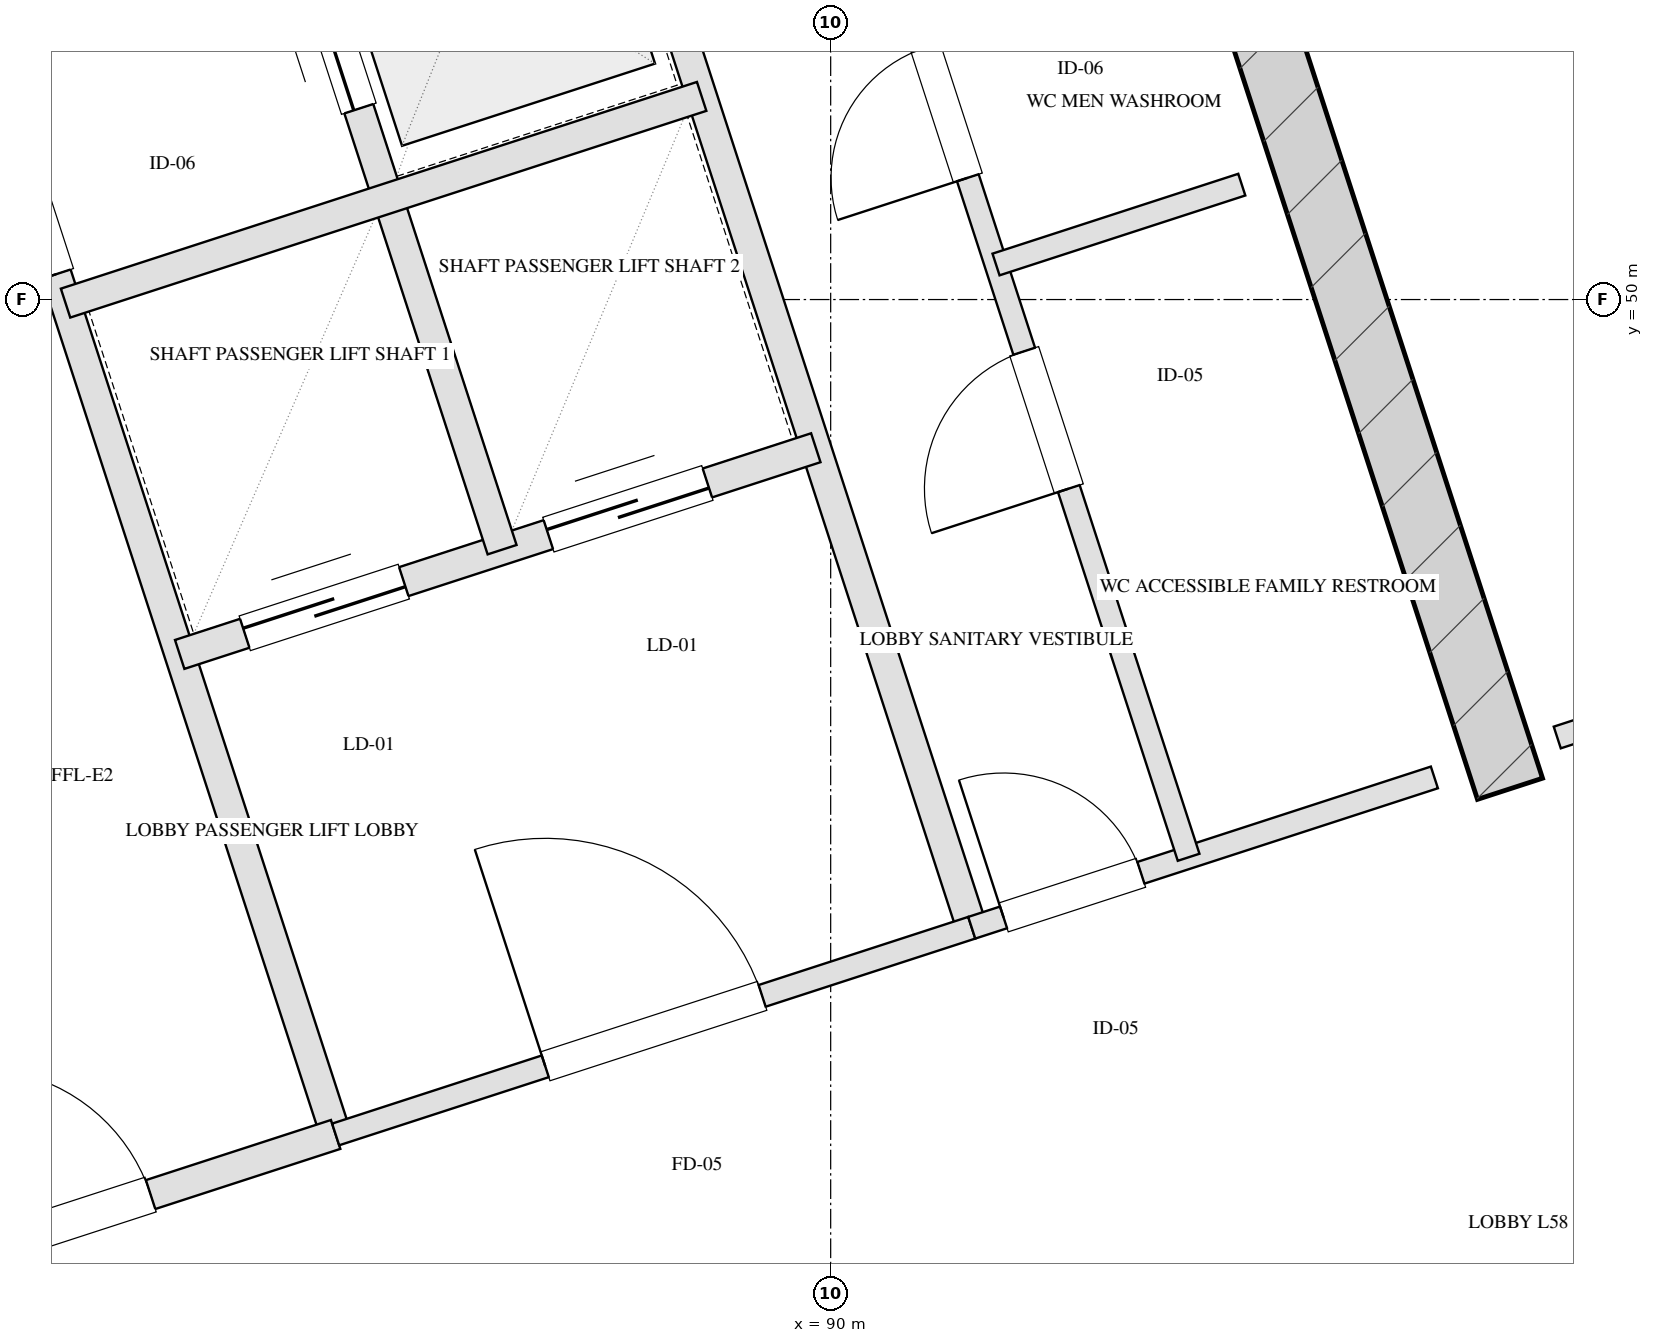
"""IFC4 building model, lengths in metres.
Left out: names, types, materials, properties, quantities, classifications, styles, units other than length and angle.
Written with IfcOpenShell. Run it as: python <this file> out.ifc"""

import sys

from ifc_helpers import new_model, si_unit, direction, frame, frame_2d, origin, place, context, subcontext, project, spatial, rectangle, extrude, element, fill, save


model = new_model("IFC4")
c1 = context("Model", 3, precision=1e-05, world=origin(), true_north=direction((0.0, 1.0)))
c2 = subcontext(c1, "Body", "Model", "MODEL_VIEW")
j1 = project(units=[si_unit("LENGTHUNIT", "METRE"), si_unit("PLANEANGLEUNIT", "RADIAN")], contexts=[c1])
p1 = place(None, origin())
s1 = spatial("IfcSite", under=j1, at=p1, CompositionType="ELEMENT")
p2 = place(p1, origin())
s2 = spatial("IfcBuilding", under=s1, at=p2, CompositionType="ELEMENT")
p3 = place(p2, frame((0.0, 0.0, 216.2)))
s3 = spatial("IfcBuildingStorey", under=s2, at=p3, CompositionType="ELEMENT", Elevation=216.2)
p4 = place(p3, frame((76.415, 50.489, 0.0), z_axis=(0.0, 0.0, 1.0), x_axis=(0.951056810414, 0.309016089169, 0.0)))
e1 = element("IfcWall", 1, at=p4, inside=s3, PredefinedType="SHEAR", context=c2, shape_type="SweptSolid", body=[
    extrude(rectangle(XDim=16.25, YDim=0.45, at=frame_2d((8.125, 0.0))), origin(), (0.0, 0.0, 1.0), 3.45),
])
p5 = place(p3, frame((94.469, 46.781, 0.0), z_axis=(0.0, 0.0, 1.0), x_axis=(-0.309004419953, 0.951060601881, 0.0)))
e2 = element("IfcWall", 2, at=p5, inside=s3, PredefinedType="SHEAR", context=c2, shape_type="SweptSolid", body=[
    extrude(rectangle(XDim=9.33, YDim=0.45, at=frame_2d((4.665, 0.0))), origin(), (0.0, 0.0, 1.0), 3.45),
])
p6 = place(p3, frame((72.165, 50.706, 0.0), z_axis=(0.0, 0.0, 1.0), x_axis=(0.951058012937, 0.309012388148, 0.0)))
e3 = element("IfcWall", 3, at=p6, inside=s3, PredefinedType="SOLIDWALL", context=c2, shape_type="SweptSolid", body=[
    extrude(rectangle(XDim=23.6, YDim=0.4, at=frame_2d((11.8, 0.0))), origin(), (0.0, 0.0, 1.0), 2.55),
])
p7 = place(p3, frame((86.743, 44.508, 0.0), z_axis=(0.0, 0.0, 1.0), x_axis=(-0.309016001439, 0.951056838919, 0.0)))
e4 = element("IfcWall", 4, at=p7, inside=s3, PredefinedType="PARTITIONING", context=c2, shape_type="SweptSolid", body=[
    extrude(rectangle(XDim=8.43, YDim=0.2, at=frame_2d((4.215, 0.0))), origin(), (0.0, 0.0, 1.0), 3.155),
])
p8 = place(p7, frame((5.95, 0.0, 0.0)))
e5 = element("IfcOpeningElement", 5, at=p8, cuts=e4, PredefinedType="OPENING", context=c2, shape_type="SweptSolid", body=[
    extrude(rectangle(XDim=0.9, YDim=2.05, at=frame_2d((0.45, 1.025))), frame((0.0, 0.11, 0.0), z_axis=(0.0, -1.0, 0.0), x_axis=(1.0, 0.0, 0.0)), (0.0, 0.0, 1.0), 0.22),
])
p9 = place(p3, frame((83.101, 43.324, 0.0), z_axis=(0.0, 0.0, 1.0), x_axis=(0.951052804469, 0.309028417967, 0.0)))
e6 = element("IfcWall", 6, at=p9, inside=s3, PredefinedType="PARTITIONING", context=c2, shape_type="SweptSolid", body=[
    extrude(rectangle(XDim=3.83, YDim=0.2, at=frame_2d((1.915, 0.0))), origin(), (0.0, 0.0, 1.0), 3.155),
])
p10 = place(p9, frame((1.35, 0.0, 0.0)))
e7 = element("IfcOpeningElement", 7, at=p10, cuts=e6, PredefinedType="OPENING", context=c2, shape_type="SweptSolid", body=[
    extrude(rectangle(XDim=1.2, YDim=2.05, at=frame_2d((0.6, 1.025))), frame((0.0, 0.11, 0.0), z_axis=(0.0, -1.0, 0.0), x_axis=(1.0, 0.0, 0.0)), (0.0, 0.0, 1.0), 0.22),
])
p11 = place(p3, frame((90.928, 45.868, 0.0), z_axis=(0.0, 0.0, 1.0), x_axis=(-0.309042196757, 0.951048327176, 0.0)))
e8 = element("IfcWall", 8, at=p11, inside=s3, PredefinedType="PARTITIONING", context=c2, shape_type="SweptSolid", body=[
    extrude(rectangle(XDim=8.43, YDim=0.2, at=frame_2d((4.215, 0.0))), origin(), (0.0, 0.0, 1.0), 3.155),
])
p12 = place(p3, frame((86.743, 44.508, 0.0), z_axis=(0.0, 0.0, 1.0), x_axis=(0.951063829732, 0.308994485023, 0.0)))
e9 = element("IfcWall", 9, at=p12, inside=s3, PredefinedType="PARTITIONING", context=c2, shape_type="SweptSolid", body=[
    extrude(rectangle(XDim=4.4, YDim=0.15, at=frame_2d((2.2, 0.0))), origin(), (0.0, 0.0, 1.0), 3.155),
])
p13 = place(p12, frame((1.45, 0.0, 0.0)))
e10 = element("IfcOpeningElement", 10, at=p13, cuts=e9, PredefinedType="OPENING", context=c2, shape_type="SweptSolid", body=[
    extrude(rectangle(XDim=1.5, YDim=2.05, at=frame_2d((0.75, 1.025))), frame((0.0, 0.085, 0.0), z_axis=(0.0, -1.0, 0.0), x_axis=(1.0, 0.0, 0.0)), (0.0, 0.0, 1.0), 0.17),
])
p14 = place(p3, frame((85.718, 47.666, 0.0), z_axis=(0.0, 0.0, 1.0), x_axis=(0.951058531764, 0.30901079133, 0.0)))
e11 = element("IfcWall", 11, at=p14, inside=s3, PredefinedType="PARTITIONING", context=c2, shape_type="SweptSolid", body=[
    extrude(rectangle(XDim=4.4, YDim=0.2, at=frame_2d((2.2, 0.0))), origin(), (0.0, 0.0, 1.0), 3.155),
])
p15 = place(p14, frame((0.45, 0.0, 0.0)))
e12 = element("IfcOpeningElement", 12, at=p15, cuts=e11, PredefinedType="OPENING", context=c2, shape_type="SweptSolid", body=[
    extrude(rectangle(XDim=1.1, YDim=2.05, at=frame_2d((0.55, 1.025))), frame((0.0, 0.11, 0.0), z_axis=(0.0, -1.0, 0.0), x_axis=(1.0, 0.0, 0.0)), (0.0, 0.0, 1.0), 0.22),
])
p16 = place(p14, frame((2.55, 0.0, 0.0)))
e13 = element("IfcOpeningElement", 13, at=p16, cuts=e11, PredefinedType="OPENING", context=c2, shape_type="SweptSolid", body=[
    extrude(rectangle(XDim=1.1, YDim=2.05, at=frame_2d((0.55, 1.025))), frame((0.0, 0.11, 0.0), z_axis=(0.0, -1.0, 0.0), x_axis=(1.0, 0.0, 0.0)), (0.0, 0.0, 1.0), 0.22),
])
p17 = place(p3, frame((87.838, 48.354, 0.0), z_axis=(0.0, 0.0, 1.0), x_axis=(-0.3090093719, 0.951058992953, 0.0)))
e14 = element("IfcWall", 14, at=p17, inside=s3, PredefinedType="PARTITIONING", context=c2, shape_type="SweptSolid", body=[
    extrude(rectangle(XDim=5.11, YDim=0.2, at=frame_2d((2.555, 0.0))), origin(), (0.0, 0.0, 1.0), 3.155),
])
p18 = place(p17, frame((3.05, 0.0, 0.0)))
e15 = element("IfcOpeningElement", 15, at=p18, cuts=e14, PredefinedType="OPENING", context=c2, shape_type="SweptSolid", body=[
    extrude(rectangle(XDim=1.1, YDim=2.05, at=frame_2d((0.55, 1.025))), frame((0.0, 0.11, 0.0), z_axis=(0.0, -1.0, 0.0), x_axis=(1.0, 0.0, 0.0)), (0.0, 0.0, 1.0), 0.22),
])
p19 = place(p3, frame((84.967, 49.977, 0.0), z_axis=(0.0, 0.0, 1.0), x_axis=(0.951063829732, 0.308994485023, 0.0)))
e16 = element("IfcWall", 16, at=p19, inside=s3, PredefinedType="PARTITIONING", context=c2, shape_type="SweptSolid", body=[
    extrude(rectangle(XDim=4.4, YDim=0.2, at=frame_2d((2.2, 0.0))), origin(), (0.0, 0.0, 1.0), 3.155),
])
p20 = place(p3, frame((90.928, 45.868, 0.0), z_axis=(0.0, 0.0, 1.0), x_axis=(0.951059297078, 0.309008435874, 0.0)))
e17 = element("IfcWall", 17, at=p20, inside=s3, PredefinedType="PARTITIONING", context=c2, shape_type="SweptSolid", body=[
    extrude(rectangle(XDim=3.2, YDim=0.15, at=frame_2d((1.6, 0.0))), origin(), (0.0, 0.0, 1.0), 3.155),
])
p21 = place(p20, frame((0.22, 0.0, 0.0)))
e18 = element("IfcOpeningElement", 18, at=p21, cuts=e17, PredefinedType="OPENING", context=c2, shape_type="SweptSolid", body=[
    extrude(rectangle(XDim=0.95, YDim=2.05, at=frame_2d((0.475, 1.025))), frame((0.0, 0.085, 0.0), z_axis=(0.0, -1.0, 0.0), x_axis=(1.0, 0.0, 0.0)), (0.0, 0.0, 1.0), 0.17),
])
p22 = place(p3, frame((92.355, 46.331, 0.0), z_axis=(0.0, 0.0, 1.0), x_axis=(-0.309007490203, 0.951059604335, 0.0)))
e19 = element("IfcWall", 19, at=p22, inside=s3, PredefinedType="PARTITIONING", context=c2, shape_type="SweptSolid", body=[
    extrude(rectangle(XDim=8.43, YDim=0.15, at=frame_2d((4.215, 0.0))), origin(), (0.0, 0.0, 1.0), 3.155),
])
p23 = place(p22, frame((2.55, 0.0, 0.0)))
e20 = element("IfcOpeningElement", 20, at=p23, cuts=e19, PredefinedType="OPENING", context=c2, shape_type="SweptSolid", body=[
    extrude(rectangle(XDim=0.95, YDim=2.05, at=frame_2d((0.475, 1.025))), frame((0.0, 0.085, 0.0), z_axis=(0.0, -1.0, 0.0), x_axis=(1.0, 0.0, 0.0)), (0.0, 0.0, 1.0), 0.17),
])
p24 = place(p22, frame((4.7, 0.0, 0.0)))
e21 = element("IfcOpeningElement", 21, at=p24, cuts=e19, PredefinedType="OPENING", context=c2, shape_type="SweptSolid", body=[
    extrude(rectangle(XDim=0.9, YDim=2.05, at=frame_2d((0.45, 1.025))), frame((0.0, 0.085, 0.0), z_axis=(0.0, -1.0, 0.0), x_axis=(1.0, 0.0, 0.0)), (0.0, 0.0, 1.0), 0.17),
])
p25 = place(p22, frame((6.8, 0.0, 0.0)))
e22 = element("IfcOpeningElement", 22, at=p25, cuts=e19, PredefinedType="OPENING", context=c2, shape_type="SweptSolid", body=[
    extrude(rectangle(XDim=0.9, YDim=2.05, at=frame_2d((0.45, 1.025))), frame((0.0, 0.085, 0.0), z_axis=(0.0, -1.0, 0.0), x_axis=(1.0, 0.0, 0.0)), (0.0, 0.0, 1.0), 0.17),
])
p26 = place(p3, frame((91.088, 50.23, 0.0), z_axis=(0.0, 0.0, 1.0), x_axis=(0.951054116971, 0.309024378638, 0.0)))
e23 = element("IfcWall", 23, at=p26, inside=s3, PredefinedType="PARTITIONING", context=c2, shape_type="SweptSolid", body=[
    extrude(rectangle(XDim=1.7, YDim=0.15, at=frame_2d((0.85, 0.0))), origin(), (0.0, 0.0, 1.0), 3.155),
])
p27 = place(p3, frame((94.78, 47.119, 0.0), z_axis=(0.0, 0.0, 1.0), x_axis=(0.951055112834, 0.309021313752, 0.0)))
e24 = element("IfcWall", 24, at=p27, inside=s3, PredefinedType="PARTITIONING", context=c2, shape_type="SweptSolid", body=[
    extrude(rectangle(XDim=5.2, YDim=0.15, at=frame_2d((2.6, 0.0))), origin(), (0.0, 0.0, 1.0), 3.155),
])
p28 = place(p27, frame((2.184, 0.0, 0.0)))
e25 = element("IfcOpeningElement", 25, at=p28, cuts=e24, PredefinedType="OPENING", context=c2, shape_type="SweptSolid", body=[
    extrude(rectangle(XDim=1.0, YDim=2.05, at=frame_2d((0.5, 1.025))), frame((0.0, 0.085, 0.0), z_axis=(0.0, -1.0, 0.0), x_axis=(1.0, 0.0, 0.0)), (0.0, 0.0, 1.0), 0.17),
])
p29 = place(p8, origin())
e26 = element("IfcDoor", 26, at=p29, inside=s3, OperationType="SINGLE_SWING_LEFT", PredefinedType="DOOR", context=c2, shape_type="SweptSolid", body=[
    extrude(rectangle(XDim=0.9, YDim=2.05, at=frame_2d((0.45, 1.025))), frame((0.0, 0.025, 0.0), z_axis=(0.0, -1.0, 0.0), x_axis=(1.0, 0.0, 0.0)), (0.0, 0.0, 1.0), 0.05),
])
fill(e5, e26)
p30 = place(p10, origin())
e27 = element("IfcDoor", 27, at=p30, inside=s3, OperationType="SINGLE_SWING_LEFT", PredefinedType="DOOR", context=c2, shape_type="SweptSolid", body=[
    extrude(rectangle(XDim=1.2, YDim=2.05, at=frame_2d((0.6, 1.025))), frame((0.0, 0.025, 0.0), z_axis=(0.0, -1.0, 0.0), x_axis=(1.0, 0.0, 0.0)), (0.0, 0.0, 1.0), 0.05),
])
fill(e7, e27)
p31 = place(p13, origin())
e28 = element("IfcDoor", 28, at=p31, inside=s3, OperationType="SINGLE_SWING_LEFT", PredefinedType="DOOR", context=c2, shape_type="SweptSolid", body=[
    extrude(rectangle(XDim=1.5, YDim=2.05, at=frame_2d((0.75, 1.025))), frame((0.0, 0.025, 0.0), z_axis=(0.0, -1.0, 0.0), x_axis=(1.0, 0.0, 0.0)), (0.0, 0.0, 1.0), 0.05),
])
fill(e10, e28)
p32 = place(p15, origin())
e29 = element("IfcDoor", 29, at=p32, inside=s3, OperationType="DOUBLE_DOOR_SLIDING", PredefinedType="DOOR", context=c2, shape_type="SweptSolid", body=[
    extrude(rectangle(XDim=1.1, YDim=2.05, at=frame_2d((0.55, 1.025))), frame((0.0, 0.025, 0.0), z_axis=(0.0, -1.0, 0.0), x_axis=(1.0, 0.0, 0.0)), (0.0, 0.0, 1.0), 0.05),
])
fill(e12, e29)
p33 = place(p16, origin())
e30 = element("IfcDoor", 30, at=p33, inside=s3, OperationType="DOUBLE_DOOR_SLIDING", PredefinedType="DOOR", context=c2, shape_type="SweptSolid", body=[
    extrude(rectangle(XDim=1.1, YDim=2.05, at=frame_2d((0.55, 1.025))), frame((0.0, 0.025, 0.0), z_axis=(0.0, -1.0, 0.0), x_axis=(1.0, 0.0, 0.0)), (0.0, 0.0, 1.0), 0.05),
])
fill(e13, e30)
p34 = place(p18, origin())
e31 = element("IfcDoor", 31, at=p34, inside=s3, OperationType="DOUBLE_DOOR_SLIDING", PredefinedType="DOOR", context=c2, shape_type="SweptSolid", body=[
    extrude(rectangle(XDim=1.1, YDim=2.05, at=frame_2d((0.55, 1.025))), frame((0.0, 0.025, 0.0), z_axis=(0.0, -1.0, 0.0), x_axis=(1.0, 0.0, 0.0)), (0.0, 0.0, 1.0), 0.05),
])
fill(e15, e31)
p35 = place(p21, origin())
e32 = element("IfcDoor", 32, at=p35, inside=s3, OperationType="SINGLE_SWING_LEFT", PredefinedType="DOOR", context=c2, shape_type="SweptSolid", body=[
    extrude(rectangle(XDim=0.95, YDim=2.05, at=frame_2d((0.475, 1.025))), frame((0.0, 0.025, 0.0), z_axis=(0.0, -1.0, 0.0), x_axis=(1.0, 0.0, 0.0)), (0.0, 0.0, 1.0), 0.05),
])
fill(e18, e32)
p36 = place(p23, origin())
e33 = element("IfcDoor", 33, at=p36, inside=s3, OperationType="SINGLE_SWING_LEFT", PredefinedType="DOOR", context=c2, shape_type="SweptSolid", body=[
    extrude(rectangle(XDim=0.95, YDim=2.05, at=frame_2d((0.475, 1.025))), frame((0.0, 0.025, 0.0), z_axis=(0.0, -1.0, 0.0), x_axis=(1.0, 0.0, 0.0)), (0.0, 0.0, 1.0), 0.05),
])
fill(e20, e33)
p37 = place(p24, origin())
e34 = element("IfcDoor", 34, at=p37, inside=s3, OperationType="SINGLE_SWING_LEFT", PredefinedType="DOOR", context=c2, shape_type="SweptSolid", body=[
    extrude(rectangle(XDim=0.9, YDim=2.05, at=frame_2d((0.45, 1.025))), frame((0.0, 0.025, 0.0), z_axis=(0.0, -1.0, 0.0), x_axis=(1.0, 0.0, 0.0)), (0.0, 0.0, 1.0), 0.05),
])
fill(e21, e34)
save(model, sys.argv[1])
